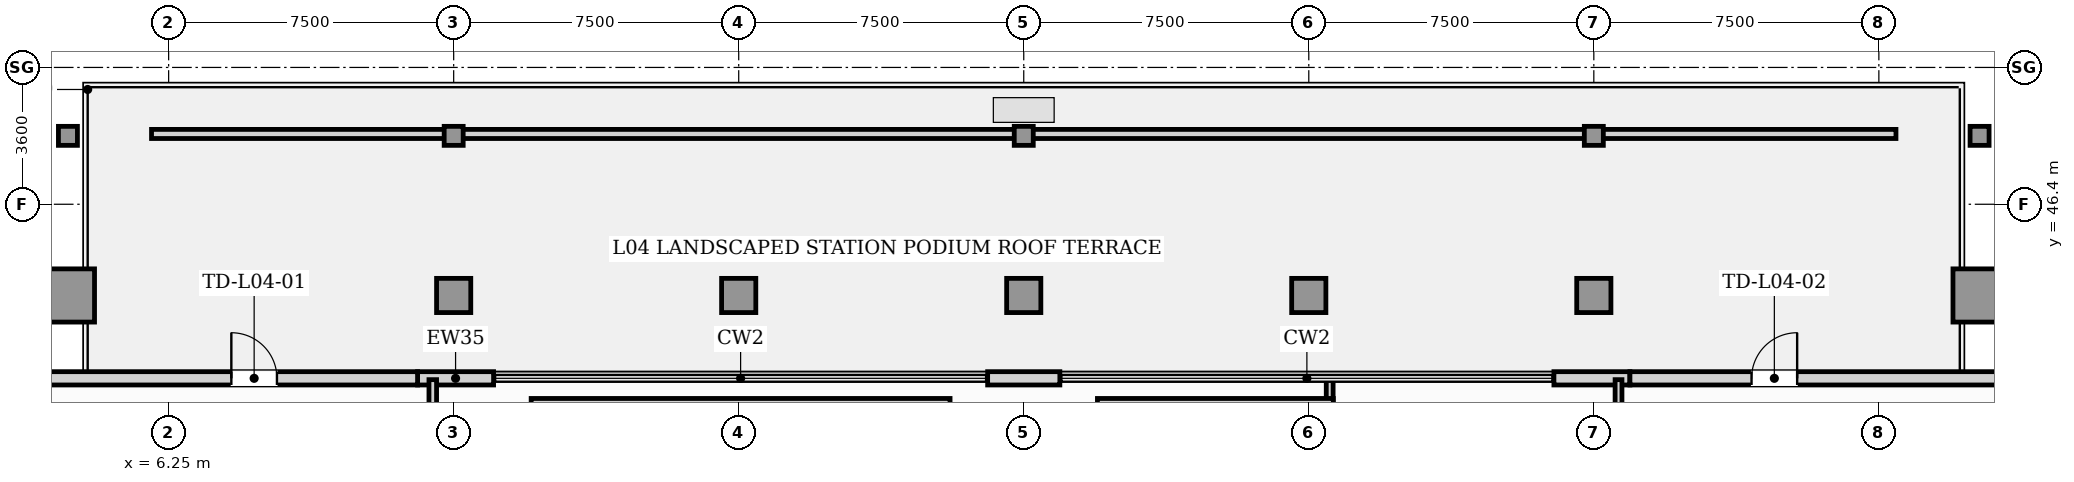
"""IFC4 building model, lengths in metres.
Left out: names, types, materials, properties, quantities, classifications, styles, units other than length and angle.
Written with IfcOpenShell. Run it as: python <this file> out.ifc"""

import sys

from ifc_helpers import new_model, si_unit, direction, frame, frame_2d, origin, origin_2d, place, context, subcontext, project, spatial, rectangle, hollow_rectangle, extrude, element, fill, save


model = new_model("IFC4")
c1 = context("Model", 3, precision=1e-05, world=origin(), true_north=direction((0.0, 1.0)))
c2 = subcontext(c1, "Body", "Model", "MODEL_VIEW")
j1 = project(units=[si_unit("LENGTHUNIT", "METRE"), si_unit("PLANEANGLEUNIT", "RADIAN")], contexts=[c1])
p1 = place(None, origin())
s1 = spatial("IfcSite", under=j1, at=p1, CompositionType="ELEMENT")
p2 = place(p1, origin())
s2 = spatial("IfcBuilding", under=s1, at=p2, CompositionType="ELEMENT")
p3 = place(p2, frame((0.0, 0.0, 19.8)))
s3 = spatial("IfcBuildingStorey", under=s2, at=p3, CompositionType="ELEMENT", Elevation=19.8)
for number, where, z_axis, x_axis in (
    (1, (53.9, 44.0, 0.0), (0.0, 0.0, 1.0), (1.0, 0.0, 0.0)),
    (2, (3.6, 44.0, 0.0), (0.0, 0.0, 1.0), (1.0, 0.0, 0.0)),
):
    element("IfcColumn", number, at=place(p3, frame(where, z_axis=z_axis, x_axis=x_axis)), inside=s3, PredefinedType="USERDEFINED", context=c2, shape_type="SweptSolid", body=[
        extrude(hollow_rectangle(XDim=1.4, YDim=1.4, WallThickness=0.08, at=origin_2d()), origin(), (0.0, 0.0, 1.0), 4.8),
    ])
for number, where, z_axis, x_axis in (
    (3, (13.75, 44.0, 0.0), (0.0, 0.0, 1.0), (1.0, 0.0, 0.0)),
    (4, (28.75, 44.0, 0.0), (0.0, 0.0, 1.0), (1.0, 0.0, 0.0)),
    (5, (43.75, 44.0, 0.0), (0.0, 0.0, 1.0), (1.0, 0.0, 0.0)),
    (6, (21.25, 44.0, 0.0), (0.0, 0.0, 1.0), (1.0, 0.0, 0.0)),
    (7, (36.25, 44.0, 0.0), (0.0, 0.0, 1.0), (1.0, 0.0, 0.0)),
):
    element("IfcColumn", number, at=place(p3, frame(where, z_axis=z_axis, x_axis=x_axis)), inside=s3, PredefinedType="COLUMN", context=c2, shape_type="SweptSolid", body=[
        extrude(rectangle(XDim=0.9, YDim=0.9, at=origin_2d()), origin(), (0.0, 0.0, 1.0), 4.8),
    ])
for number, where, z_axis, x_axis in (
    (8, (3.6, 48.2, 0.0), (0.0, 0.0, 1.0), (1.0, 0.0, 0.0)),
    (9, (13.75, 48.2, 0.0), (0.0, 0.0, 1.0), (1.0, 0.0, 0.0)),
    (10, (28.75, 48.2, 0.0), (0.0, 0.0, 1.0), (1.0, 0.0, 0.0)),
    (11, (43.75, 48.2, 0.0), (0.0, 0.0, 1.0), (1.0, 0.0, 0.0)),
    (12, (53.9, 48.2, 0.0), (0.0, 0.0, 1.0), (1.0, 0.0, 0.0)),
):
    element("IfcColumn", number, at=place(p3, frame(where, z_axis=z_axis, x_axis=x_axis)), inside=s3, PredefinedType="COLUMN", context=c2, shape_type="SweptSolid", body=[
        extrude(hollow_rectangle(XDim=0.5, YDim=0.5, WallThickness=0.032, at=origin_2d()), origin(), (0.0, 0.0, 1.0), 4.8),
    ])
p4 = place(p3, frame((12.8, 41.82, 0.0), z_axis=(0.0, 0.0, 1.0), x_axis=(1.0, 0.0, 0.0)))
e13 = element("IfcWall", 13, at=p4, inside=s3, PredefinedType="SOLIDWALL", context=c2, shape_type="SweptSolid", body=[
    extrude(rectangle(XDim=2.0, YDim=0.35, at=frame_2d((1.0, 0.0))), origin(), (0.0, 0.0, 1.0), 4.4),
])
p5 = place(p3, frame((27.8, 41.82, 0.0), z_axis=(0.0, 0.0, 1.0), x_axis=(1.0, 0.0, 0.0)))
e14 = element("IfcWall", 14, at=p5, inside=s3, PredefinedType="SOLIDWALL", context=c2, shape_type="SweptSolid", body=[
    extrude(rectangle(XDim=1.9, YDim=0.35, at=frame_2d((0.95, 0.0))), origin(), (0.0, 0.0, 1.0), 4.4),
])
p6 = place(p3, frame((42.7, 41.82, 0.0), z_axis=(0.0, 0.0, 1.0), x_axis=(1.0, 0.0, 0.0)))
e15 = element("IfcWall", 15, at=p6, inside=s3, PredefinedType="SOLIDWALL", context=c2, shape_type="SweptSolid", body=[
    extrude(rectangle(XDim=2.0, YDim=0.35, at=frame_2d((1.0, 0.0))), origin(), (0.0, 0.0, 1.0), 4.4),
])
p7 = place(p3, frame((-7.86, 41.82, 0.0), z_axis=(0.0, 0.0, 1.0), x_axis=(1.0, 0.0, 0.0)))
e16 = element("IfcWall", 16, at=p7, inside=s3, PredefinedType="SOLIDWALL", context=c2, shape_type="SweptSolid", body=[
    extrude(rectangle(XDim=20.66, YDim=0.35, at=frame_2d((10.33, 0.0))), origin(), (0.0, 0.0, 1.0), 4.4),
])
p8 = place(p7, frame((15.76, 0.0, 0.0)))
e17 = element("IfcOpeningElement", 17, at=p8, cuts=e16, PredefinedType="OPENING", context=c2, shape_type="SweptSolid", body=[
    extrude(rectangle(XDim=1.2, YDim=2.2, at=frame_2d((0.6, 1.1))), frame((0.0, 0.185, 0.0), z_axis=(0.0, -1.0, 0.0), x_axis=(1.0, 0.0, 0.0)), (0.0, 0.0, 1.0), 0.37),
])
p9 = place(p3, frame((44.7, 41.82, 0.0), z_axis=(0.0, 0.0, 1.0), x_axis=(1.0, 0.0, 0.0)))
e18 = element("IfcWall", 18, at=p9, inside=s3, PredefinedType="SOLIDWALL", context=c2, shape_type="SweptSolid", body=[
    extrude(rectangle(XDim=21.96, YDim=0.35, at=frame_2d((10.98, 0.0))), origin(), (0.0, 0.0, 1.0), 4.4),
])
p10 = place(p9, frame((3.2, 0.0, 0.0)))
e19 = element("IfcOpeningElement", 19, at=p10, cuts=e18, PredefinedType="OPENING", context=c2, shape_type="SweptSolid", body=[
    extrude(rectangle(XDim=1.2, YDim=2.2, at=frame_2d((0.6, 1.1))), frame((0.0, 0.185, 0.0), z_axis=(0.0, -1.0, 0.0), x_axis=(1.0, 0.0, 0.0)), (0.0, 0.0, 1.0), 0.37),
])
p11 = place(p3, frame((5.8, 48.25, 0.0), z_axis=(0.0, 0.0, 1.0), x_axis=(1.0, 0.0, 0.0)))
e20 = element("IfcWall", 20, at=p11, inside=s3, PredefinedType="PARAPET", context=c2, shape_type="SweptSolid", body=[
    extrude(rectangle(XDim=45.9, YDim=0.24, at=frame_2d((22.95, 0.0))), origin(), (0.0, 0.0, 1.0), 0.55),
])
p12 = place(p3, frame((13.2, 14.705, 0.0), z_axis=(0.0, 0.0, 1.0), x_axis=(0.0, 1.0, 0.0)))
e21 = element("IfcWall", 21, at=p12, inside=s3, PredefinedType="PARTITIONING", context=c2, shape_type="SweptSolid", body=[
    extrude(rectangle(XDim=27.08, YDim=0.2, at=frame_2d((13.54, 0.0))), origin(), (0.0, 0.0, 1.0), 4.4),
])
p13 = place(p3, frame((36.8, 31.607, 0.0), z_axis=(0.0, 0.0, 1.0), x_axis=(0.0, 1.0, 0.0)))
e22 = element("IfcWall", 22, at=p13, inside=s3, PredefinedType="PARTITIONING", context=c2, shape_type="SweptSolid", body=[
    extrude(rectangle(XDim=10.195, YDim=0.18, at=frame_2d((5.097, 0.0))), origin(), (0.0, 0.0, 1.0), 4.4),
])
p14 = place(p3, frame((36.895, 41.2, 0.0), z_axis=(0.0, 0.0, 1.0), x_axis=(-1.0, 0.0, 0.0)))
e23 = element("IfcWall", 23, at=p14, inside=s3, PredefinedType="PARTITIONING", context=c2, shape_type="SweptSolid", body=[
    extrude(rectangle(XDim=6.206, YDim=0.18, at=frame_2d((3.103, 0.0))), origin(), (0.0, 0.0, 1.0), 4.4),
])
p15 = place(p3, frame((26.811, 41.2, 0.0), z_axis=(0.0, 0.0, 1.0), x_axis=(-1.0, 0.0, 0.0)))
e24 = element("IfcWall", 24, at=p15, inside=s3, PredefinedType="PARTITIONING", context=c2, shape_type="SweptSolid", body=[
    extrude(rectangle(XDim=11.022, YDim=0.18, at=frame_2d((5.511, 0.0))), origin(), (0.0, 0.0, 1.0), 4.4),
])
p16 = place(p3, frame((44.4, 41.785, 0.0), z_axis=(0.0, 0.0, 1.0), x_axis=(0.0, -1.0, 0.0)))
e25 = element("IfcWall", 25, at=p16, inside=s3, PredefinedType="PARTITIONING", context=c2, shape_type="SweptSolid", body=[
    extrude(rectangle(XDim=10.177, YDim=0.18, at=frame_2d((5.089, 0.0))), origin(), (0.0, 0.0, 1.0), 4.4),
])
p17 = place(p8, origin())
e26 = element("IfcDoor", 26, at=p17, inside=s3, OperationType="SINGLE_SWING_LEFT", PredefinedType="DOOR", context=c2, shape_type="SweptSolid", body=[
    extrude(rectangle(XDim=1.2, YDim=2.2, at=frame_2d((0.6, 1.1))), frame((0.0, 0.025, 0.0), z_axis=(0.0, -1.0, 0.0), x_axis=(1.0, 0.0, 0.0)), (0.0, 0.0, 1.0), 0.05),
])
fill(e17, e26)
p18 = place(p10, origin())
e27 = element("IfcDoor", 27, at=p18, inside=s3, OperationType="SINGLE_SWING_RIGHT", PredefinedType="DOOR", context=c2, shape_type="SweptSolid", body=[
    extrude(rectangle(XDim=1.2, YDim=2.2, at=frame_2d((0.6, 1.1))), frame((0.0, 0.025, 0.0), z_axis=(0.0, -1.0, 0.0), x_axis=(1.0, 0.0, 0.0)), (0.0, 0.0, 1.0), 0.05),
])
fill(e19, e27)
save(model, sys.argv[1])
